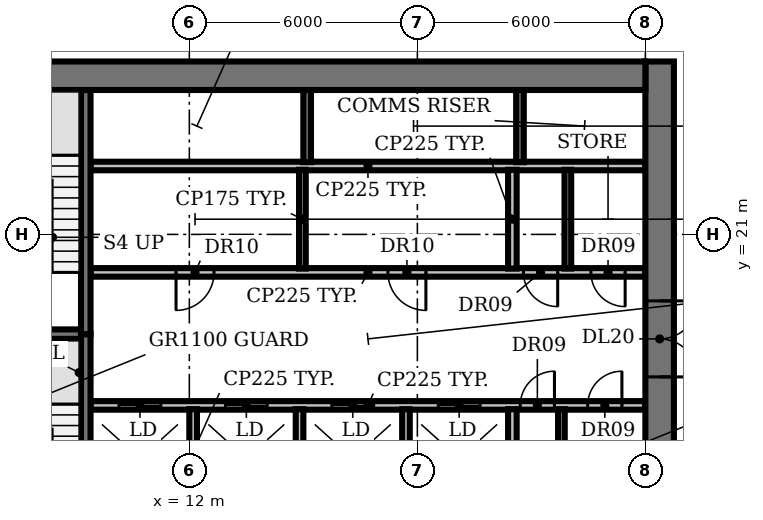
"""IFC4 building model, lengths in metres.
Left out: names, types, materials, properties, quantities, classifications, styles, units other than length and angle.
Written with IfcOpenShell. Run it as: python <this file> out.ifc"""

import sys

from ifc_helpers import new_model, si_unit, direction, frame, frame_2d, origin, place, context, subcontext, project, spatial, rectangle, extrude, element, fill, save


model = new_model("IFC4")
c1 = context("Model", 3, precision=1e-05, world=origin(), true_north=direction((0.0, 1.0)))
c2 = subcontext(c1, "Body", "Model", "MODEL_VIEW")
j1 = project(units=[si_unit("LENGTHUNIT", "METRE"), si_unit("PLANEANGLEUNIT", "RADIAN")], contexts=[c1])
p1 = place(None, origin())
s1 = spatial("IfcSite", under=j1, at=p1, CompositionType="ELEMENT")
p2 = place(p1, origin())
s2 = spatial("IfcBuilding", under=s1, at=p2, CompositionType="ELEMENT")
p3 = place(p2, frame((0.0, 0.0, 108.8)))
s3 = spatial("IfcBuildingStorey", under=s2, at=p3, CompositionType="ELEMENT", Elevation=108.8)
p4 = place(p3, frame((9.4, 16.5, 0.0), z_axis=(0.0, 0.0, 1.0), x_axis=(1.0, 0.0, 0.0)))
e1 = element("IfcWall", 1, at=p4, inside=s3, PredefinedType="PARTITIONING", context=c2, shape_type="SweptSolid", body=[
    extrude(rectangle(XDim=14.6, YDim=0.225, at=frame_2d((7.3, 0.0))), origin(), (0.0, 0.0, 1.0), 3.85),
])
p5 = place(p4, frame((0.75, 0.0, 0.0)))
e2 = element("IfcOpeningElement", 2, at=p5, cuts=e1, PredefinedType="OPENING", context=c2, shape_type="SweptSolid", body=[
    extrude(rectangle(XDim=1.1, YDim=2.1, at=frame_2d((0.55, 1.05))), frame((0.0, 0.123, 0.0), z_axis=(0.0, -1.0, 0.0), x_axis=(1.0, 0.0, 0.0)), (0.0, 0.0, 1.0), 0.245),
])
p6 = place(p4, frame((3.55, 0.0, 0.0)))
e3 = element("IfcOpeningElement", 3, at=p6, cuts=e1, PredefinedType="OPENING", context=c2, shape_type="SweptSolid", body=[
    extrude(rectangle(XDim=1.1, YDim=2.1, at=frame_2d((0.55, 1.05))), frame((0.0, 0.123, 0.0), z_axis=(0.0, -1.0, 0.0), x_axis=(1.0, 0.0, 0.0)), (0.0, 0.0, 1.0), 0.245),
])
p7 = place(p4, frame((6.35, 0.0, 0.0)))
e4 = element("IfcOpeningElement", 4, at=p7, cuts=e1, PredefinedType="OPENING", context=c2, shape_type="SweptSolid", body=[
    extrude(rectangle(XDim=1.1, YDim=2.1, at=frame_2d((0.55, 1.05))), frame((0.0, 0.123, 0.0), z_axis=(0.0, -1.0, 0.0), x_axis=(1.0, 0.0, 0.0)), (0.0, 0.0, 1.0), 0.245),
])
p8 = place(p4, frame((9.15, 0.0, 0.0)))
e5 = element("IfcOpeningElement", 5, at=p8, cuts=e1, PredefinedType="OPENING", context=c2, shape_type="SweptSolid", body=[
    extrude(rectangle(XDim=1.1, YDim=2.1, at=frame_2d((0.55, 1.05))), frame((0.0, 0.123, 0.0), z_axis=(0.0, -1.0, 0.0), x_axis=(1.0, 0.0, 0.0)), (0.0, 0.0, 1.0), 0.245),
])
p9 = place(p4, frame((11.308, 0.0, 0.0)))
e6 = element("IfcOpeningElement", 6, at=p9, cuts=e1, PredefinedType="OPENING", context=c2, shape_type="SweptSolid", body=[
    extrude(rectangle(XDim=0.9, YDim=2.1, at=frame_2d((0.45, 1.05))), frame((0.0, 0.123, 0.0), z_axis=(0.0, -1.0, 0.0), x_axis=(1.0, 0.0, 0.0)), (0.0, 0.0, 1.0), 0.245),
])
p10 = place(p4, frame((13.083, 0.0, 0.0)))
e7 = element("IfcOpeningElement", 7, at=p10, cuts=e1, PredefinedType="OPENING", context=c2, shape_type="SweptSolid", body=[
    extrude(rectangle(XDim=0.9, YDim=2.1, at=frame_2d((0.45, 1.05))), frame((0.0, 0.123, 0.0), z_axis=(0.0, -1.0, 0.0), x_axis=(1.0, 0.0, 0.0)), (0.0, 0.0, 1.0), 0.245),
])
p11 = place(p3, frame((6.0, 18.375, 0.0), z_axis=(0.0, 0.0, 1.0), x_axis=(1.0, 0.0, 0.0)))
e8 = element("IfcWall", 8, at=p11, inside=s3, PredefinedType="SHEAR", context=c2, shape_type="SweptSolid", body=[
    extrude(rectangle(XDim=3.15, YDim=0.25, at=frame_2d((1.575, 0.0))), origin(), (0.0, 0.0, 1.0), 3.85),
])
p12 = place(p3, frame((24.0, 20.0, 0.0), z_axis=(0.0, 0.0, 1.0), x_axis=(-1.0, 0.0, 0.0)))
e9 = element("IfcWall", 9, at=p12, inside=s3, PredefinedType="PARTITIONING", context=c2, shape_type="SweptSolid", body=[
    extrude(rectangle(XDim=14.6, YDim=0.225, at=frame_2d((7.3, 0.0))), origin(), (0.0, 0.0, 1.0), 3.85),
])
p13 = place(p12, frame((11.35, 0.0, 0.0)))
e10 = element("IfcOpeningElement", 10, at=p13, cuts=e9, PredefinedType="OPENING", context=c2, shape_type="SweptSolid", body=[
    extrude(rectangle(XDim=1.0, YDim=2.1, at=frame_2d((0.5, 1.05))), frame((0.0, 0.123, 0.0), z_axis=(0.0, -1.0, 0.0), x_axis=(1.0, 0.0, 0.0)), (0.0, 0.0, 1.0), 0.245),
])
p14 = place(p12, frame((5.775, 0.0, 0.0)))
e11 = element("IfcOpeningElement", 11, at=p14, cuts=e9, PredefinedType="OPENING", context=c2, shape_type="SweptSolid", body=[
    extrude(rectangle(XDim=1.0, YDim=2.1, at=frame_2d((0.5, 1.05))), frame((0.0, 0.123, 0.0), z_axis=(0.0, -1.0, 0.0), x_axis=(1.0, 0.0, 0.0)), (0.0, 0.0, 1.0), 0.245),
])
p15 = place(p12, frame((2.308, 0.0, 0.0)))
e12 = element("IfcOpeningElement", 12, at=p15, cuts=e9, PredefinedType="OPENING", context=c2, shape_type="SweptSolid", body=[
    extrude(rectangle(XDim=0.9, YDim=2.1, at=frame_2d((0.45, 1.05))), frame((0.0, 0.123, 0.0), z_axis=(0.0, -1.0, 0.0), x_axis=(1.0, 0.0, 0.0)), (0.0, 0.0, 1.0), 0.245),
])
p16 = place(p12, frame((0.532, 0.0, 0.0)))
e13 = element("IfcOpeningElement", 13, at=p16, cuts=e9, PredefinedType="OPENING", context=c2, shape_type="SweptSolid", body=[
    extrude(rectangle(XDim=0.9, YDim=2.1, at=frame_2d((0.45, 1.05))), frame((0.0, 0.123, 0.0), z_axis=(0.0, -1.0, 0.0), x_axis=(1.0, 0.0, 0.0)), (0.0, 0.0, 1.0), 0.245),
])
p17 = place(p3, frame((9.4, 22.8, 0.0), z_axis=(0.0, 0.0, 1.0), x_axis=(1.0, 0.0, 0.0)))
e14 = element("IfcWall", 14, at=p17, inside=s3, PredefinedType="PARTITIONING", context=c2, shape_type="SweptSolid", body=[
    extrude(rectangle(XDim=14.6, YDim=0.225, at=frame_2d((7.3, 0.0))), origin(), (0.0, 0.0, 1.0), 3.85),
])
p18 = place(p3, frame((9.275, 18.375, 0.0), z_axis=(0.0, 0.0, 1.0), x_axis=(0.0, -1.0, 0.0)))
e15 = element("IfcWall", 15, at=p18, inside=s3, PredefinedType="SHEAR", context=c2, shape_type="SweptSolid", body=[
    extrude(rectangle(XDim=6.55, YDim=0.25, at=frame_2d((3.275, 0.0))), origin(), (0.0, 0.0, 1.0), 3.85),
])
p19 = place(p18, frame((5.075, 0.0, 0.0)))
e16 = element("IfcOpeningElement", 16, at=p19, cuts=e15, PredefinedType="OPENING", context=c2, shape_type="SweptSolid", body=[
    extrude(rectangle(XDim=1.0, YDim=2.1, at=frame_2d((0.5, 1.05))), frame((0.0, 0.135, 0.0), z_axis=(0.0, -1.0, 0.0), x_axis=(1.0, 0.0, 0.0)), (0.0, 0.0, 1.0), 0.27),
])
p20 = place(p3, frame((9.275, 18.375, 0.0), z_axis=(0.0, 0.0, 1.0), x_axis=(0.0, 1.0, 0.0)))
e17 = element("IfcWall", 17, at=p20, inside=s3, PredefinedType="SHEAR", context=c2, shape_type="SweptSolid", body=[
    extrude(rectangle(XDim=6.425, YDim=0.25, at=frame_2d((3.212, 0.0))), origin(), (0.0, 0.0, 1.0), 3.85),
])
for number, where, z_axis, x_axis in (
    (18, (12.1, 13.8, 0.0), (0.0, 0.0, 1.0), (0.0, 1.0, 0.0)),
    (19, (14.9, 13.8, 0.0), (0.0, 0.0, 1.0), (0.0, 1.0, 0.0)),
):
    element("IfcWall", number, at=place(p3, frame(where, z_axis=z_axis, x_axis=x_axis)), inside=s3, PredefinedType="SOLIDWALL", context=c2, shape_type="SweptSolid", body=[
        extrude(rectangle(XDim=2.6, YDim=0.2, at=frame_2d((1.3, 0.0))), origin(), (0.0, 0.0, 1.0), 3.85),
    ])
p21 = place(p3, frame((14.975, 20.1, 0.0), z_axis=(0.0, 0.0, 1.0), x_axis=(0.0, 1.0, 0.0)))
e20 = element("IfcWall", 20, at=p21, inside=s3, PredefinedType="PARTITIONING", context=c2, shape_type="SweptSolid", body=[
    extrude(rectangle(XDim=2.6, YDim=0.175, at=frame_2d((1.3, 0.0))), origin(), (0.0, 0.0, 1.0), 3.85),
])
p22 = place(p3, frame((15.1, 22.9, 0.0), z_axis=(0.0, 0.0, 1.0), x_axis=(0.0, 1.0, 0.0)))
e21 = element("IfcWall", 21, at=p22, inside=s3, PredefinedType="SHEAR", context=c2, shape_type="SweptSolid", body=[
    extrude(rectangle(XDim=1.9, YDim=0.2, at=frame_2d((0.95, 0.0))), origin(), (0.0, 0.0, 1.0), 3.85),
])
p23 = place(p3, frame((17.7, 13.8, 0.0), z_axis=(0.0, 0.0, 1.0), x_axis=(0.0, 1.0, 0.0)))
e22 = element("IfcWall", 22, at=p23, inside=s3, PredefinedType="SOLIDWALL", context=c2, shape_type="SweptSolid", body=[
    extrude(rectangle(XDim=2.6, YDim=0.2, at=frame_2d((1.3, 0.0))), origin(), (0.0, 0.0, 1.0), 3.85),
])
for number, where, z_axis, x_axis in (
    (23, (20.5, 13.8, 0.0), (0.0, 0.0, 1.0), (0.0, 1.0, 0.0)),
    (24, (20.5, 20.1, 0.0), (0.0, 0.0, 1.0), (0.0, 1.0, 0.0)),
):
    element("IfcWall", number, at=place(p3, frame(where, z_axis=z_axis, x_axis=x_axis)), inside=s3, PredefinedType="PARTITIONING", context=c2, shape_type="SweptSolid", body=[
        extrude(rectangle(XDim=2.6, YDim=0.225, at=frame_2d((1.3, 0.0))), origin(), (0.0, 0.0, 1.0), 3.85),
    ])
p24 = place(p3, frame((20.7, 22.9, 0.0), z_axis=(0.0, 0.0, 1.0), x_axis=(0.0, 1.0, 0.0)))
e25 = element("IfcWall", 25, at=p24, inside=s3, PredefinedType="SHEAR", context=c2, shape_type="SweptSolid", body=[
    extrude(rectangle(XDim=1.9, YDim=0.2, at=frame_2d((0.95, 0.0))), origin(), (0.0, 0.0, 1.0), 3.85),
])
for number, where, z_axis, x_axis in (
    (26, (21.79, 13.8, 0.0), (0.0, 0.0, 1.0), (0.0, 1.0, 0.0)),
    (27, (21.96, 20.1, 0.0), (0.0, 0.0, 1.0), (0.0, 1.0, 0.0)),
):
    element("IfcWall", number, at=place(p3, frame(where, z_axis=z_axis, x_axis=x_axis)), inside=s3, PredefinedType="PARTITIONING", context=c2, shape_type="SweptSolid", body=[
        extrude(rectangle(XDim=2.6, YDim=0.175, at=frame_2d((1.3, 0.0))), origin(), (0.0, 0.0, 1.0), 3.85),
    ])
p25 = place(p3, frame((24.375, 25.55, 0.0), z_axis=(0.0, 0.0, 1.0), x_axis=(0.0, -1.0, 0.0)))
e28 = element("IfcWall", 28, at=p25, inside=s3, PredefinedType="SHEAR", context=c2, shape_type="SweptSolid", body=[
    extrude(rectangle(XDim=21.13, YDim=0.75, at=frame_2d((10.565, 0.0))), origin(), (0.0, 0.0, 1.0), 3.85),
])
p26 = place(p25, frame((18.4, 0.0, 0.0)))
e29 = element("IfcOpeningElement", 29, at=p26, cuts=e28, PredefinedType="OPENING", context=c2, shape_type="SweptSolid", body=[
    extrude(rectangle(XDim=1.5, YDim=2.1, at=frame_2d((0.75, 1.05))), frame((0.0, 0.385, 0.0), z_axis=(0.0, -1.0, 0.0), x_axis=(1.0, 0.0, 0.0)), (0.0, 0.0, 1.0), 0.77),
])
p27 = place(p25, frame((12.3, 0.0, 0.0)))
e30 = element("IfcOpeningElement", 30, at=p27, cuts=e28, PredefinedType="OPENING", context=c2, shape_type="SweptSolid", body=[
    extrude(rectangle(XDim=0.9, YDim=2.1, at=frame_2d((0.45, 1.05))), frame((0.0, 0.385, 0.0), z_axis=(0.0, -1.0, 0.0), x_axis=(1.0, 0.0, 0.0)), (0.0, 0.0, 1.0), 0.77),
])
p28 = place(p25, frame((6.3, 0.0, 0.0)))
e31 = element("IfcOpeningElement", 31, at=p28, cuts=e28, PredefinedType="OPENING", context=c2, shape_type="SweptSolid", body=[
    extrude(rectangle(XDim=2.0, YDim=2.1, at=frame_2d((1.0, 1.05))), frame((0.0, 0.385, 0.0), z_axis=(0.0, -1.0, 0.0), x_axis=(1.0, 0.0, 0.0)), (0.0, 0.0, 1.0), 0.77),
])
p29 = place(p3, frame((6.0, 25.175, 0.0), z_axis=(0.0, 0.0, 1.0), x_axis=(1.0, 0.0, 0.0)))
e32 = element("IfcWall", 32, at=p29, inside=s3, PredefinedType="SHEAR", context=c2, shape_type="SweptSolid", body=[
    extrude(rectangle(XDim=18.0, YDim=0.75, at=frame_2d((9.0, 0.0))), origin(), (0.0, 0.0, 1.0), 3.85),
])
p30 = place(p5, origin())
e33 = element("IfcDoor", 33, at=p30, inside=s3, OperationType="DOUBLE_DOOR_SLIDING", PredefinedType="DOOR", context=c2, shape_type="SweptSolid", body=[
    extrude(rectangle(XDim=1.1, YDim=2.1, at=frame_2d((0.55, 1.05))), frame((0.0, 0.025, 0.0), z_axis=(0.0, -1.0, 0.0), x_axis=(1.0, 0.0, 0.0)), (0.0, 0.0, 1.0), 0.05),
])
fill(e2, e33)
p31 = place(p6, origin())
e34 = element("IfcDoor", 34, at=p31, inside=s3, OperationType="DOUBLE_DOOR_SLIDING", PredefinedType="DOOR", context=c2, shape_type="SweptSolid", body=[
    extrude(rectangle(XDim=1.1, YDim=2.1, at=frame_2d((0.55, 1.05))), frame((0.0, 0.025, 0.0), z_axis=(0.0, -1.0, 0.0), x_axis=(1.0, 0.0, 0.0)), (0.0, 0.0, 1.0), 0.05),
])
fill(e3, e34)
p32 = place(p7, origin())
e35 = element("IfcDoor", 35, at=p32, inside=s3, OperationType="DOUBLE_DOOR_SLIDING", PredefinedType="DOOR", context=c2, shape_type="SweptSolid", body=[
    extrude(rectangle(XDim=1.1, YDim=2.1, at=frame_2d((0.55, 1.05))), frame((0.0, 0.025, 0.0), z_axis=(0.0, -1.0, 0.0), x_axis=(1.0, 0.0, 0.0)), (0.0, 0.0, 1.0), 0.05),
])
fill(e4, e35)
p33 = place(p8, origin())
e36 = element("IfcDoor", 36, at=p33, inside=s3, OperationType="DOUBLE_DOOR_SLIDING", PredefinedType="DOOR", context=c2, shape_type="SweptSolid", body=[
    extrude(rectangle(XDim=1.1, YDim=2.1, at=frame_2d((0.55, 1.05))), frame((0.0, 0.025, 0.0), z_axis=(0.0, -1.0, 0.0), x_axis=(1.0, 0.0, 0.0)), (0.0, 0.0, 1.0), 0.05),
])
fill(e5, e36)
p34 = place(p9, origin())
e37 = element("IfcDoor", 37, at=p34, inside=s3, OperationType="SINGLE_SWING_RIGHT", PredefinedType="DOOR", context=c2, shape_type="SweptSolid", body=[
    extrude(rectangle(XDim=0.9, YDim=2.1, at=frame_2d((0.45, 1.05))), frame((0.0, 0.025, 0.0), z_axis=(0.0, -1.0, 0.0), x_axis=(1.0, 0.0, 0.0)), (0.0, 0.0, 1.0), 0.05),
])
fill(e6, e37)
p35 = place(p10, origin())
e38 = element("IfcDoor", 38, at=p35, inside=s3, OperationType="SINGLE_SWING_RIGHT", PredefinedType="DOOR", context=c2, shape_type="SweptSolid", body=[
    extrude(rectangle(XDim=0.9, YDim=2.1, at=frame_2d((0.45, 1.05))), frame((0.0, 0.025, 0.0), z_axis=(0.0, -1.0, 0.0), x_axis=(1.0, 0.0, 0.0)), (0.0, 0.0, 1.0), 0.05),
])
fill(e7, e38)
p36 = place(p13, origin())
e39 = element("IfcDoor", 39, at=p36, inside=s3, OperationType="SINGLE_SWING_RIGHT", PredefinedType="DOOR", context=c2, shape_type="SweptSolid", body=[
    extrude(rectangle(XDim=1.0, YDim=2.1, at=frame_2d((0.5, 1.05))), frame((0.0, 0.025, 0.0), z_axis=(0.0, -1.0, 0.0), x_axis=(1.0, 0.0, 0.0)), (0.0, 0.0, 1.0), 0.05),
])
fill(e10, e39)
p37 = place(p14, origin())
e40 = element("IfcDoor", 40, at=p37, inside=s3, OperationType="SINGLE_SWING_LEFT", PredefinedType="DOOR", context=c2, shape_type="SweptSolid", body=[
    extrude(rectangle(XDim=1.0, YDim=2.1, at=frame_2d((0.5, 1.05))), frame((0.0, 0.025, 0.0), z_axis=(0.0, -1.0, 0.0), x_axis=(1.0, 0.0, 0.0)), (0.0, 0.0, 1.0), 0.05),
])
fill(e11, e40)
p38 = place(p15, origin())
e41 = element("IfcDoor", 41, at=p38, inside=s3, OperationType="SINGLE_SWING_LEFT", PredefinedType="DOOR", context=c2, shape_type="SweptSolid", body=[
    extrude(rectangle(XDim=0.9, YDim=2.1, at=frame_2d((0.45, 1.05))), frame((0.0, 0.025, 0.0), z_axis=(0.0, -1.0, 0.0), x_axis=(1.0, 0.0, 0.0)), (0.0, 0.0, 1.0), 0.05),
])
fill(e12, e41)
p39 = place(p16, origin())
e42 = element("IfcDoor", 42, at=p39, inside=s3, OperationType="SINGLE_SWING_LEFT", PredefinedType="DOOR", context=c2, shape_type="SweptSolid", body=[
    extrude(rectangle(XDim=0.9, YDim=2.1, at=frame_2d((0.45, 1.05))), frame((0.0, 0.025, 0.0), z_axis=(0.0, -1.0, 0.0), x_axis=(1.0, 0.0, 0.0)), (0.0, 0.0, 1.0), 0.05),
])
fill(e13, e42)
p40 = place(p28, origin())
e43 = element("IfcDoor", 43, at=p40, inside=s3, OperationType="DOUBLE_DOOR_SINGLE_SWING", PredefinedType="DOOR", context=c2, shape_type="SweptSolid", body=[
    extrude(rectangle(XDim=2.0, YDim=2.1, at=frame_2d((1.0, 1.05))), frame((0.0, 0.025, 0.0), z_axis=(0.0, -1.0, 0.0), x_axis=(1.0, 0.0, 0.0)), (0.0, 0.0, 1.0), 0.05),
])
fill(e31, e43)
save(model, sys.argv[1])
